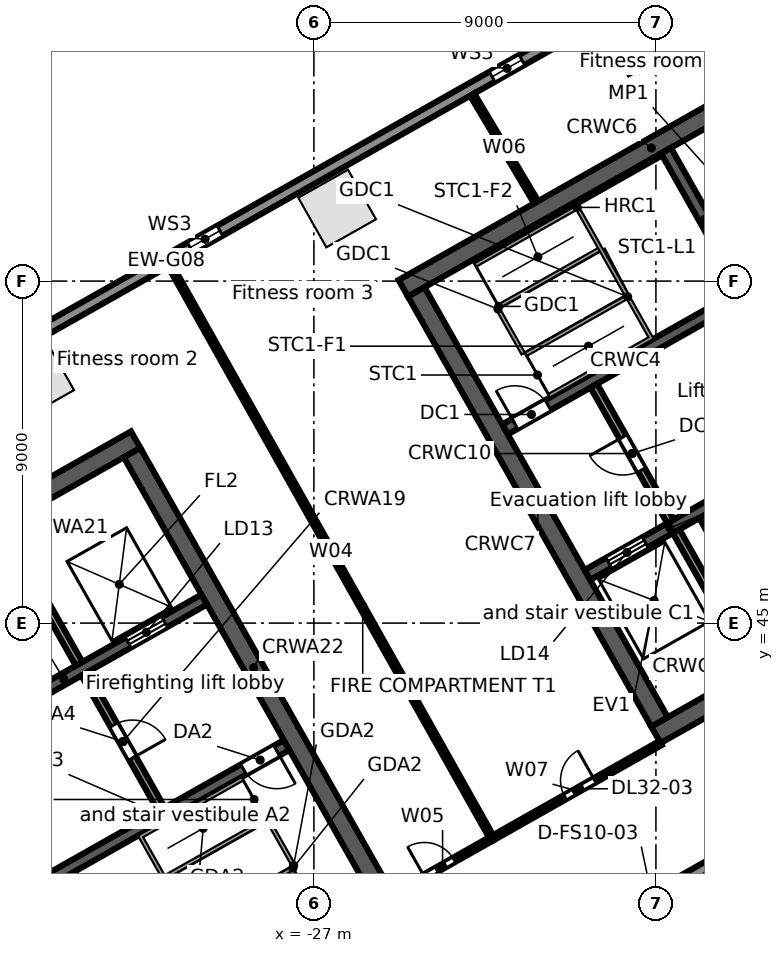
"""IFC4 building model, lengths in metres.
Left out: names, types, materials, properties, quantities, classifications, styles, units other than length and angle.
Written with IfcOpenShell. Run it as: python <this file> out.ifc"""

import sys

from ifc_helpers import new_model, si_unit, direction, frame, frame_2d, origin, origin_2d, place, context, subcontext, project, spatial, rectangle, extrude, element, fill, save


model = new_model("IFC4")
c1 = context("Model", 3, precision=1e-05, world=origin(), true_north=direction((0.0, 1.0)))
c2 = subcontext(c1, "Body", "Model", "MODEL_VIEW")
j1 = project(units=[si_unit("LENGTHUNIT", "METRE"), si_unit("PLANEANGLEUNIT", "RADIAN")], contexts=[c1])
p1 = place(None, origin())
s1 = spatial("IfcSite", under=j1, at=p1, CompositionType="ELEMENT")
p2 = place(p1, origin())
s2 = spatial("IfcBuilding", under=s1, at=p2, CompositionType="ELEMENT")
p3 = place(p2, frame((0.0, 0.0, 154.9)))
s3 = spatial("IfcBuildingStorey", under=s2, at=p3, CompositionType="ELEMENT", Elevation=154.9)
for number, where, z_axis, x_axis in (
    (1, (-18.441, 60.406, 0.0), (0.0, 0.0, 1.0), (-0.87, -0.492, 0.0)),
    (2, (-26.388, 55.91, 0.0), (0.0, 0.0, 1.0), (-0.87, -0.492, 0.0)),
    (3, (-34.334, 51.414, 0.0), (0.0, 0.0, 1.0), (-0.87, -0.492, 0.0)),
):
    element("IfcColumn", number, at=place(p3, frame(where, z_axis=z_axis, x_axis=x_axis)), inside=s3, PredefinedType="COLUMN", context=c2, shape_type="SweptSolid", body=[
        extrude(rectangle(XDim=1.5, YDim=1.5, at=origin_2d()), origin(), (0.0, 0.0, 1.0), 4.0),
    ])
p4 = place(p3, frame((-0.055, 47.969, 0.0), z_axis=(0.0, 0.0, 1.0), x_axis=(-0.870355730478, -0.492423499058, 0.0)))
e4 = element("IfcWall", 4, at=p4, inside=s3, PredefinedType="STANDARD", context=c2, shape_type="SweptSolid", body=[
    extrude(rectangle(XDim=43.75, YDim=0.3, at=frame_2d((21.875, 0.0))), origin(), (0.0, 0.0, 1.0), 3.68),
])
p5 = place(p4, frame((39.977, 0.0, 0.6)))
e5 = element("IfcOpeningElement", 5, at=p5, cuts=e4, PredefinedType="OPENING", context=c2, shape_type="SweptSolid", body=[
    extrude(rectangle(XDim=0.9, YDim=2.4, at=frame_2d((0.45, 1.2))), frame((0.0, 0.16, 0.0), z_axis=(0.0, -1.0, 0.0), x_axis=(1.0, 0.0, 0.0)), (0.0, 0.0, 1.0), 0.32),
])
p6 = place(p4, frame((37.338, 0.0, 0.0)))
e6 = element("IfcOpeningElement", 6, at=p6, cuts=e4, PredefinedType="OPENING", context=c2, shape_type="SweptSolid", body=[
    extrude(rectangle(XDim=1.8, YDim=2.4, at=frame_2d((0.9, 1.2))), frame((0.0, 0.16, 0.0), z_axis=(0.0, -1.0, 0.0), x_axis=(1.0, 0.0, 0.0)), (0.0, 0.0, 1.0), 0.32),
])
p7 = place(p4, frame((31.222, 0.0, 0.6)))
e7 = element("IfcOpeningElement", 7, at=p7, cuts=e4, PredefinedType="OPENING", context=c2, shape_type="SweptSolid", body=[
    extrude(rectangle(XDim=0.9, YDim=2.4, at=frame_2d((0.45, 1.2))), frame((0.0, 0.16, 0.0), z_axis=(0.0, -1.0, 0.0), x_axis=(1.0, 0.0, 0.0)), (0.0, 0.0, 1.0), 0.32),
])
p8 = place(p4, frame((28.584, 0.0, 0.0)))
e8 = element("IfcOpeningElement", 8, at=p8, cuts=e4, PredefinedType="OPENING", context=c2, shape_type="SweptSolid", body=[
    extrude(rectangle(XDim=1.8, YDim=2.4, at=frame_2d((0.9, 1.2))), frame((0.0, 0.16, 0.0), z_axis=(0.0, -1.0, 0.0), x_axis=(1.0, 0.0, 0.0)), (0.0, 0.0, 1.0), 0.32),
])
p9 = place(p4, frame((22.468, 0.0, 0.6)))
e9 = element("IfcOpeningElement", 9, at=p9, cuts=e4, PredefinedType="OPENING", context=c2, shape_type="SweptSolid", body=[
    extrude(rectangle(XDim=0.9, YDim=2.4, at=frame_2d((0.45, 1.2))), frame((0.0, 0.16, 0.0), z_axis=(0.0, -1.0, 0.0), x_axis=(1.0, 0.0, 0.0)), (0.0, 0.0, 1.0), 0.32),
])
p10 = place(p4, frame((19.829, 0.0, 0.0)))
e10 = element("IfcOpeningElement", 10, at=p10, cuts=e4, PredefinedType="OPENING", context=c2, shape_type="SweptSolid", body=[
    extrude(rectangle(XDim=1.8, YDim=2.4, at=frame_2d((0.9, 1.2))), frame((0.0, 0.16, 0.0), z_axis=(0.0, -1.0, 0.0), x_axis=(1.0, 0.0, 0.0)), (0.0, 0.0, 1.0), 0.32),
])
p11 = place(p4, frame((13.713, 0.0, 0.6)))
e11 = element("IfcOpeningElement", 11, at=p11, cuts=e4, PredefinedType="OPENING", context=c2, shape_type="SweptSolid", body=[
    extrude(rectangle(XDim=0.9, YDim=2.4, at=frame_2d((0.45, 1.2))), frame((0.0, 0.16, 0.0), z_axis=(0.0, -1.0, 0.0), x_axis=(1.0, 0.0, 0.0)), (0.0, 0.0, 1.0), 0.32),
])
p12 = place(p4, frame((11.075, 0.0, 0.0)))
e12 = element("IfcOpeningElement", 12, at=p12, cuts=e4, PredefinedType="OPENING", context=c2, shape_type="SweptSolid", body=[
    extrude(rectangle(XDim=1.8, YDim=2.4, at=frame_2d((0.9, 1.2))), frame((0.0, 0.16, 0.0), z_axis=(0.0, -1.0, 0.0), x_axis=(1.0, 0.0, 0.0)), (0.0, 0.0, 1.0), 0.32),
])
p13 = place(p4, frame((4.959, 0.0, 0.6)))
e13 = element("IfcOpeningElement", 13, at=p13, cuts=e4, PredefinedType="OPENING", context=c2, shape_type="SweptSolid", body=[
    extrude(rectangle(XDim=0.9, YDim=2.4, at=frame_2d((0.45, 1.2))), frame((0.0, 0.16, 0.0), z_axis=(0.0, -1.0, 0.0), x_axis=(1.0, 0.0, 0.0)), (0.0, 0.0, 1.0), 0.32),
])
p14 = place(p4, frame((2.32, 0.0, 0.0)))
e14 = element("IfcOpeningElement", 14, at=p14, cuts=e4, PredefinedType="OPENING", context=c2, shape_type="SweptSolid", body=[
    extrude(rectangle(XDim=1.8, YDim=2.4, at=frame_2d((0.9, 1.2))), frame((0.0, 0.16, 0.0), z_axis=(0.0, -1.0, 0.0), x_axis=(1.0, 0.0, 0.0)), (0.0, 0.0, 1.0), 0.32),
])
p15 = place(p3, frame((-58.745, 38.764, 0.0), z_axis=(0.0, 0.0, 1.0), x_axis=(0.870355811726, 0.492423355453, 0.0)))
e15 = element("IfcWall", 15, at=p15, inside=s3, PredefinedType="STANDARD", context=c2, shape_type="SweptSolid", body=[
    extrude(rectangle(XDim=64.025, YDim=0.3, at=frame_2d((32.013, 0.0))), origin(), (0.0, 0.0, 1.0), 3.68),
])
p16 = place(p15, frame((60.122, 0.0, 0.6)))
e16 = element("IfcOpeningElement", 16, at=p16, cuts=e15, PredefinedType="OPENING", context=c2, shape_type="SweptSolid", body=[
    extrude(rectangle(XDim=0.9, YDim=2.4, at=frame_2d((0.45, 1.2))), frame((0.0, 0.16, 0.0), z_axis=(0.0, -1.0, 0.0), x_axis=(1.0, 0.0, 0.0)), (0.0, 0.0, 1.0), 0.32),
])
p17 = place(p15, frame((50.992, 0.0, 0.6)))
e17 = element("IfcOpeningElement", 17, at=p17, cuts=e15, PredefinedType="OPENING", context=c2, shape_type="SweptSolid", body=[
    extrude(rectangle(XDim=0.9, YDim=2.4, at=frame_2d((0.45, 1.2))), frame((0.0, 0.16, 0.0), z_axis=(0.0, -1.0, 0.0), x_axis=(1.0, 0.0, 0.0)), (0.0, 0.0, 1.0), 0.32),
])
p18 = place(p15, frame((41.862, 0.0, 0.6)))
e18 = element("IfcOpeningElement", 18, at=p18, cuts=e15, PredefinedType="OPENING", context=c2, shape_type="SweptSolid", body=[
    extrude(rectangle(XDim=0.9, YDim=2.4, at=frame_2d((0.45, 1.2))), frame((0.0, 0.16, 0.0), z_axis=(0.0, -1.0, 0.0), x_axis=(1.0, 0.0, 0.0)), (0.0, 0.0, 1.0), 0.32),
])
p19 = place(p15, frame((32.732, 0.0, 0.6)))
e19 = element("IfcOpeningElement", 19, at=p19, cuts=e15, PredefinedType="OPENING", context=c2, shape_type="SweptSolid", body=[
    extrude(rectangle(XDim=0.9, YDim=2.4, at=frame_2d((0.45, 1.2))), frame((0.0, 0.16, 0.0), z_axis=(0.0, -1.0, 0.0), x_axis=(1.0, 0.0, 0.0)), (0.0, 0.0, 1.0), 0.32),
])
p20 = place(p15, frame((23.602, 0.0, 0.6)))
e20 = element("IfcOpeningElement", 20, at=p20, cuts=e15, PredefinedType="OPENING", context=c2, shape_type="SweptSolid", body=[
    extrude(rectangle(XDim=0.9, YDim=2.4, at=frame_2d((0.45, 1.2))), frame((0.0, 0.16, 0.0), z_axis=(0.0, -1.0, 0.0), x_axis=(1.0, 0.0, 0.0)), (0.0, 0.0, 1.0), 0.32),
])
p21 = place(p15, frame((14.472, 0.0, 0.6)))
e21 = element("IfcOpeningElement", 21, at=p21, cuts=e15, PredefinedType="OPENING", context=c2, shape_type="SweptSolid", body=[
    extrude(rectangle(XDim=0.9, YDim=2.4, at=frame_2d((0.45, 1.2))), frame((0.0, 0.16, 0.0), z_axis=(0.0, -1.0, 0.0), x_axis=(1.0, 0.0, 0.0)), (0.0, 0.0, 1.0), 0.32),
])
p22 = place(p15, frame((5.342, 0.0, 0.6)))
e22 = element("IfcOpeningElement", 22, at=p22, cuts=e15, PredefinedType="OPENING", context=c2, shape_type="SweptSolid", body=[
    extrude(rectangle(XDim=0.9, YDim=2.4, at=frame_2d((0.45, 1.2))), frame((0.0, 0.16, 0.0), z_axis=(0.0, -1.0, 0.0), x_axis=(1.0, 0.0, 0.0)), (0.0, 0.0, 1.0), 0.32),
])
p23 = place(p3, frame((-34.245, 38.097, 0.0), z_axis=(0.0, 0.0, 1.0), x_axis=(0.870364520461, 0.492407962489, 0.0)))
e23 = element("IfcWall", 23, at=p23, inside=s3, PredefinedType="SOLIDWALL", context=c2, shape_type="SweptSolid", body=[
    extrude(rectangle(XDim=7.5, YDim=0.3, at=frame_2d((3.75, 0.0))), origin(), (0.0, 0.0, 1.0), 3.68),
])
p24 = place(p23, frame((6.2, 0.0, 0.0)))
e24 = element("IfcOpeningElement", 24, at=p24, cuts=e23, PredefinedType="OPENING", context=c2, shape_type="SweptSolid", body=[
    extrude(rectangle(XDim=1.0, YDim=2.1, at=frame_2d((0.5, 1.05))), frame((0.0, 0.16, 0.0), z_axis=(0.0, -1.0, 0.0), x_axis=(1.0, 0.0, 0.0)), (0.0, 0.0, 1.0), 0.32),
])
p25 = place(p3, frame((-37.282, 41.435, 0.0), z_axis=(0.0, 0.0, 1.0), x_axis=(0.870356271124, 0.492422543467, 0.0)))
e25 = element("IfcWall", 25, at=p25, inside=s3, PredefinedType="SOLIDWALL", context=c2, shape_type="SweptSolid", body=[
    extrude(rectangle(XDim=8.5, YDim=0.3, at=frame_2d((4.25, 0.0))), origin(), (0.0, 0.0, 1.0), 3.68),
])
p26 = place(p25, frame((6.2, 0.0, 0.0)))
e26 = element("IfcOpeningElement", 26, at=p26, cuts=e25, PredefinedType="OPENING", context=c2, shape_type="SweptSolid", body=[
    extrude(rectangle(XDim=1.1, YDim=2.1, at=frame_2d((0.55, 1.05))), frame((0.0, 0.16, 0.0), z_axis=(0.0, -1.0, 0.0), x_axis=(1.0, 0.0, 0.0)), (0.0, 0.0, 1.0), 0.32),
])
p27 = place(p25, frame((1.95, 0.0, 0.0)))
e27 = element("IfcOpeningElement", 27, at=p27, cuts=e25, PredefinedType="OPENING", context=c2, shape_type="SweptSolid", body=[
    extrude(rectangle(XDim=0.9, YDim=2.1, at=frame_2d((0.45, 1.05))), frame((0.0, 0.16, 0.0), z_axis=(0.0, -1.0, 0.0), x_axis=(1.0, 0.0, 0.0)), (0.0, 0.0, 1.0), 0.32),
])
p28 = place(p3, frame((-46.486, 41.455, 0.0), z_axis=(0.0, 0.0, 1.0), x_axis=(0.870353598469, 0.492427267353, 0.0)))
e28 = element("IfcWall", 28, at=p28, inside=s3, PredefinedType="SOLIDWALL", context=c2, shape_type="SweptSolid", body=[
    extrude(rectangle(XDim=17.0, YDim=0.5, at=frame_2d((8.5, 0.0))), origin(), (0.0, 0.0, 1.0), 3.68),
])
p29 = place(p3, frame((-33.031, 43.667, 0.0), z_axis=(0.0, 0.0, 1.0), x_axis=(0.492408451753, -0.87036424366, 0.0)))
e29 = element("IfcWall", 29, at=p29, inside=s3, PredefinedType="PARTITIONING", context=c2, shape_type="SweptSolid", body=[
    extrude(rectangle(XDim=4.1, YDim=0.2, at=frame_2d((2.05, 0.0))), origin(), (0.0, 0.0, 1.0), 3.68),
])
p30 = place(p29, frame((1.55, 0.0, 0.0)))
e30 = element("IfcOpeningElement", 30, at=p30, cuts=e29, PredefinedType="OPENING", context=c2, shape_type="SweptSolid", body=[
    extrude(rectangle(XDim=1.0, YDim=2.1, at=frame_2d((0.5, 1.05))), frame((0.0, 0.11, 0.0), z_axis=(0.0, -1.0, 0.0), x_axis=(1.0, 0.0, 0.0)), (0.0, 0.0, 1.0), 0.22),
])
p31 = place(p3, frame((-35.222, 47.541, 0.0), z_axis=(0.0, 0.0, 1.0), x_axis=(0.492421666909, -0.870356767055, 0.0)))
e31 = element("IfcWall", 31, at=p31, inside=s3, PredefinedType="SOLIDWALL", context=c2, shape_type="SweptSolid", body=[
    extrude(rectangle(XDim=4.15, YDim=0.2, at=frame_2d((2.075, 0.0))), origin(), (0.0, 0.0, 1.0), 3.68),
])
p32 = place(p3, frame((-31.784, 49.486, 0.0), z_axis=(0.0, 0.0, 1.0), x_axis=(0.492435316254, -0.870349044525, 0.0)))
e32 = element("IfcWall", 32, at=p32, inside=s3, PredefinedType="SOLIDWALL", context=c2, shape_type="SweptSolid", body=[
    extrude(rectangle(XDim=13.0, YDim=0.5, at=frame_2d((6.5, 0.0))), origin(), (0.0, 0.0, 1.0), 3.68),
])
p33 = place(p3, frame((-18.0, 42.061, 0.0), z_axis=(0.0, 0.0, 1.0), x_axis=(0.870356627484, 0.492421913601, 0.0)))
e33 = element("IfcWall", 33, at=p33, inside=s3, PredefinedType="SOLIDWALL", context=c2, shape_type="SweptSolid", body=[
    extrude(rectangle(XDim=15.0, YDim=0.5, at=frame_2d((7.5, 0.0))), origin(), (0.0, 0.0, 1.0), 3.68),
])
p34 = place(p33, frame((6.1, 0.0, 0.0)))
e34 = element("IfcOpeningElement", 34, at=p34, cuts=e33, PredefinedType="OPENING", context=c2, shape_type="SweptSolid", body=[
    extrude(rectangle(XDim=1.2, YDim=2.1, at=frame_2d((0.6, 1.05))), frame((0.0, 0.26, 0.0), z_axis=(0.0, -1.0, 0.0), x_axis=(1.0, 0.0, 0.0)), (0.0, 0.0, 1.0), 0.52),
])
p35 = place(p3, frame((-19.805, 46.267, 0.0), z_axis=(0.0, 0.0, 1.0), x_axis=(0.870353598469, 0.492427267353, 0.0)))
e35 = element("IfcWall", 35, at=p35, inside=s3, PredefinedType="SOLIDWALL", context=c2, shape_type="SweptSolid", body=[
    extrude(rectangle(XDim=5.0, YDim=0.3, at=frame_2d((2.5, 0.0))), origin(), (0.0, 0.0, 1.0), 3.68),
])
p36 = place(p35, frame((0.65, 0.0, 0.0)))
e36 = element("IfcOpeningElement", 36, at=p36, cuts=e35, PredefinedType="OPENING", context=c2, shape_type="SweptSolid", body=[
    extrude(rectangle(XDim=1.1, YDim=2.1, at=frame_2d((0.55, 1.05))), frame((0.0, 0.16, 0.0), z_axis=(0.0, -1.0, 0.0), x_axis=(1.0, 0.0, 0.0)), (0.0, 0.0, 1.0), 0.32),
])
p37 = place(p35, frame((3.75, 0.0, 0.0)))
e37 = element("IfcOpeningElement", 37, at=p37, cuts=e35, PredefinedType="OPENING", context=c2, shape_type="SweptSolid", body=[
    extrude(rectangle(XDim=0.9, YDim=2.1, at=frame_2d((0.45, 1.05))), frame((0.0, 0.16, 0.0), z_axis=(0.0, -1.0, 0.0), x_axis=(1.0, 0.0, 0.0)), (0.0, 0.0, 1.0), 0.32),
])
p38 = place(p3, frame((-21.972, 50.097, 0.0), z_axis=(0.0, 0.0, 1.0), x_axis=(0.870350976978, 0.492431900747, 0.0)))
e38 = element("IfcWall", 38, at=p38, inside=s3, PredefinedType="SOLIDWALL", context=c2, shape_type="SweptSolid", body=[
    extrude(rectangle(XDim=7.3, YDim=0.3, at=frame_2d((3.65, 0.0))), origin(), (0.0, 0.0, 1.0), 3.68),
])
p39 = place(p38, frame((0.3, 0.0, 0.0)))
e39 = element("IfcOpeningElement", 39, at=p39, cuts=e38, PredefinedType="OPENING", context=c2, shape_type="SweptSolid", body=[
    extrude(rectangle(XDim=1.0, YDim=2.1, at=frame_2d((0.5, 1.05))), frame((0.0, 0.16, 0.0), z_axis=(0.0, -1.0, 0.0), x_axis=(1.0, 0.0, 0.0)), (0.0, 0.0, 1.0), 0.32),
])
p40 = place(p3, frame((-24.647, 53.811, 0.0), z_axis=(0.0, 0.0, 1.0), x_axis=(0.87034965173, 0.492434243055, 0.0)))
e40 = element("IfcWall", 40, at=p40, inside=s3, PredefinedType="SOLIDWALL", context=c2, shape_type="SweptSolid", body=[
    extrude(rectangle(XDim=15.0, YDim=0.5, at=frame_2d((7.5, 0.0))), origin(), (0.0, 0.0, 1.0), 3.68),
])
p41 = place(p3, frame((-24.307, 53.716, 0.0), z_axis=(0.0, 0.0, 1.0), x_axis=(0.492427267353, -0.870353598469, 0.0)))
e41 = element("IfcWall", 41, at=p41, inside=s3, PredefinedType="SOLIDWALL", context=c2, shape_type="SweptSolid", body=[
    extrude(rectangle(XDim=13.0, YDim=0.5, at=frame_2d((6.5, 0.0))), origin(), (0.0, 0.0, 1.0), 3.68),
])
p42 = place(p3, frame((-17.469, 47.417, 0.0), z_axis=(0.0, 0.0, 1.0), x_axis=(0.492441017253, -0.870345818929, 0.0)))
e42 = element("IfcWall", 42, at=p42, inside=s3, PredefinedType="SOLIDWALL", context=c2, shape_type="SweptSolid", body=[
    extrude(rectangle(XDim=4.15, YDim=0.2, at=frame_2d((2.075, 0.0))), origin(), (0.0, 0.0, 1.0), 3.68),
])
p43 = place(p3, frame((-19.635, 51.246, 0.0), z_axis=(0.0, 0.0, 1.0), x_axis=(0.492408451753, -0.87036424366, 0.0)))
e43 = element("IfcWall", 43, at=p43, inside=s3, PredefinedType="PARTITIONING", context=c2, shape_type="SweptSolid", body=[
    extrude(rectangle(XDim=4.1, YDim=0.2, at=frame_2d((2.05, 0.0))), origin(), (0.0, 0.0, 1.0), 3.68),
])
p44 = place(p43, frame((1.55, 0.0, 0.0)))
e44 = element("IfcOpeningElement", 44, at=p44, cuts=e43, PredefinedType="OPENING", context=c2, shape_type="SweptSolid", body=[
    extrude(rectangle(XDim=1.0, YDim=2.1, at=frame_2d((0.5, 1.05))), frame((0.0, 0.11, 0.0), z_axis=(0.0, -1.0, 0.0), x_axis=(1.0, 0.0, 0.0)), (0.0, 0.0, 1.0), 0.22),
])
p45 = place(p3, frame((-16.772, 47.811, 0.0), z_axis=(0.0, 0.0, 1.0), x_axis=(0.492441017253, -0.870345818929, 0.0)))
e45 = element("IfcWall", 45, at=p45, inside=s3, PredefinedType="SOLIDWALL", context=c2, shape_type="SweptSolid", body=[
    extrude(rectangle(XDim=4.15, YDim=0.2, at=frame_2d((2.075, 0.0))), origin(), (0.0, 0.0, 1.0), 3.68),
])
p46 = place(p3, frame((-17.736, 57.434, 0.0), z_axis=(0.0, 0.0, 1.0), x_axis=(0.492421666909, -0.870356767055, 0.0)))
e46 = element("IfcWall", 46, at=p46, inside=s3, PredefinedType="SOLIDWALL", context=c2, shape_type="SweptSolid", body=[
    extrude(rectangle(XDim=4.15, YDim=0.3, at=frame_2d((2.075, 0.0))), origin(), (0.0, 0.0, 1.0), 3.68),
])
p47 = place(p3, frame((-30.785, 54.411, 0.0), z_axis=(0.0, 0.0, 1.0), x_axis=(0.490135904292, -0.871646026391, 0.0)))
e47 = element("IfcWall", 47, at=p47, inside=s3, PredefinedType="PARTITIONING", context=c2, shape_type="SweptSolid", body=[
    extrude(rectangle(XDim=17.295, YDim=0.125, at=frame_2d((8.647, 0.0))), origin(), (0.0, 0.0, 1.0), 2.852),
])
p48 = place(p3, frame((-24.919, 37.859, 0.0), z_axis=(0.0, 0.0, 1.0), x_axis=(0.870368744559, 0.492400496034, 0.0)))
e48 = element("IfcWall", 48, at=p48, inside=s3, PredefinedType="PARTITIONING", context=c2, shape_type="SweptSolid", body=[
    extrude(rectangle(XDim=3.0, YDim=0.125, at=frame_2d((1.5, 0.0))), origin(), (0.0, 0.0, 1.0), 2.852),
])
p49 = place(p48, frame((0.95, 0.0, 0.0)))
e49 = element("IfcOpeningElement", 49, at=p49, cuts=e48, PredefinedType="OPENING", context=c2, shape_type="SweptSolid", body=[
    extrude(rectangle(XDim=0.9, YDim=2.1, at=frame_2d((0.45, 1.05))), frame((0.0, 0.073, 0.0), z_axis=(0.0, -1.0, 0.0), x_axis=(1.0, 0.0, 0.0)), (0.0, 0.0, 1.0), 0.145),
])
p50 = place(p3, frame((-22.835, 58.908, 0.0), z_axis=(0.0, 0.0, 1.0), x_axis=(0.511113859879, -0.859513014584, 0.0)))
e50 = element("IfcWall", 50, at=p50, inside=s3, PredefinedType="PARTITIONING", context=c2, shape_type="SweptSolid", body=[
    extrude(rectangle(XDim=3.295, YDim=0.125, at=frame_2d((1.647, 0.0))), origin(), (0.0, 0.0, 1.0), 2.96),
])
p51 = place(p3, frame((-22.308, 39.336, 0.0), z_axis=(0.0, 0.0, 1.0), x_axis=(0.870351090701, 0.492431699747, 0.0)))
e51 = element("IfcWall", 51, at=p51, inside=s3, PredefinedType="PARTITIONING", context=c2, shape_type="SweptSolid", body=[
    extrude(rectangle(XDim=5.091, YDim=0.125, at=frame_2d((2.546, 0.0))), origin(), (0.0, 0.0, 1.0), 3.68),
])
p52 = place(p51, frame((2.2, 0.0, 0.0)))
e52 = element("IfcOpeningElement", 52, at=p52, cuts=e51, PredefinedType="OPENING", context=c2, shape_type="SweptSolid", body=[
    extrude(rectangle(XDim=0.9, YDim=2.1, at=frame_2d((0.45, 1.05))), frame((0.0, 0.073, 0.0), z_axis=(0.0, -1.0, 0.0), x_axis=(1.0, 0.0, 0.0)), (0.0, 0.0, 1.0), 0.145),
])
p53 = place(p18, origin())
e53 = element("IfcWindow", 53, at=p53, inside=s3, PartitioningType="SINGLE_PANEL", PredefinedType="WINDOW", context=c2, shape_type="SweptSolid", body=[
    extrude(rectangle(XDim=0.9, YDim=2.4, at=frame_2d((0.45, 1.2))), frame((0.0, 0.03, 0.0), z_axis=(0.0, -1.0, 0.0), x_axis=(1.0, 0.0, 0.0)), (0.0, 0.0, 1.0), 0.06),
])
fill(e18, e53)
p54 = place(p19, origin())
e54 = element("IfcWindow", 54, at=p54, inside=s3, PartitioningType="SINGLE_PANEL", PredefinedType="WINDOW", context=c2, shape_type="SweptSolid", body=[
    extrude(rectangle(XDim=0.9, YDim=2.4, at=frame_2d((0.45, 1.2))), frame((0.0, 0.03, 0.0), z_axis=(0.0, -1.0, 0.0), x_axis=(1.0, 0.0, 0.0)), (0.0, 0.0, 1.0), 0.06),
])
fill(e19, e54)
p55 = place(p26, origin())
e55 = element("IfcDoor", 55, at=p55, inside=s3, OperationType="DOUBLE_DOOR_SLIDING", PredefinedType="DOOR", context=c2, shape_type="SweptSolid", body=[
    extrude(rectangle(XDim=1.1, YDim=2.1, at=frame_2d((0.55, 1.05))), frame((0.0, 0.025, 0.0), z_axis=(0.0, -1.0, 0.0), x_axis=(1.0, 0.0, 0.0)), (0.0, 0.0, 1.0), 0.05),
])
fill(e26, e55)
p56 = place(p24, frame((1.0, 0.0, 0.0), z_axis=(0.0, 0.0, 1.0), x_axis=(-1.0, 0.0, 0.0)))
e56 = element("IfcDoor", 56, at=p56, inside=s3, OperationType="SINGLE_SWING_LEFT", PredefinedType="DOOR", context=c2, shape_type="SweptSolid", body=[
    extrude(rectangle(XDim=1.0, YDim=2.1, at=frame_2d((0.5, 1.05))), frame((0.0, 0.025, 0.0), z_axis=(0.0, -1.0, 0.0), x_axis=(1.0, 0.0, 0.0)), (0.0, 0.0, 1.0), 0.05),
])
fill(e24, e56)
p57 = place(p30, origin())
e57 = element("IfcDoor", 57, at=p57, inside=s3, OperationType="SINGLE_SWING_RIGHT", PredefinedType="DOOR", context=c2, shape_type="SweptSolid", body=[
    extrude(rectangle(XDim=1.0, YDim=2.1, at=frame_2d((0.5, 1.05))), frame((0.0, 0.025, 0.0), z_axis=(0.0, -1.0, 0.0), x_axis=(1.0, 0.0, 0.0)), (0.0, 0.0, 1.0), 0.05),
])
fill(e30, e57)
p58 = place(p36, origin())
e58 = element("IfcDoor", 58, at=p58, inside=s3, OperationType="DOUBLE_DOOR_SLIDING", PredefinedType="DOOR", context=c2, shape_type="SweptSolid", body=[
    extrude(rectangle(XDim=1.1, YDim=2.1, at=frame_2d((0.55, 1.05))), frame((0.0, 0.025, 0.0), z_axis=(0.0, -1.0, 0.0), x_axis=(1.0, 0.0, 0.0)), (0.0, 0.0, 1.0), 0.05),
])
fill(e36, e58)
p59 = place(p39, origin())
e59 = element("IfcDoor", 59, at=p59, inside=s3, OperationType="SINGLE_SWING_LEFT", PredefinedType="DOOR", context=c2, shape_type="SweptSolid", body=[
    extrude(rectangle(XDim=1.0, YDim=2.1, at=frame_2d((0.5, 1.05))), frame((0.0, 0.025, 0.0), z_axis=(0.0, -1.0, 0.0), x_axis=(1.0, 0.0, 0.0)), (0.0, 0.0, 1.0), 0.05),
])
fill(e39, e59)
p60 = place(p44, frame((1.0, 0.0, 0.0), z_axis=(0.0, 0.0, 1.0), x_axis=(-1.0, 0.0, 0.0)))
e60 = element("IfcDoor", 60, at=p60, inside=s3, OperationType="SINGLE_SWING_RIGHT", PredefinedType="DOOR", context=c2, shape_type="SweptSolid", body=[
    extrude(rectangle(XDim=1.0, YDim=2.1, at=frame_2d((0.5, 1.05))), frame((0.0, 0.025, 0.0), z_axis=(0.0, -1.0, 0.0), x_axis=(1.0, 0.0, 0.0)), (0.0, 0.0, 1.0), 0.05),
])
fill(e44, e60)
p61 = place(p49, origin())
e61 = element("IfcDoor", 61, at=p61, inside=s3, OperationType="SINGLE_SWING_LEFT", PredefinedType="DOOR", context=c2, shape_type="SweptSolid", body=[
    extrude(rectangle(XDim=0.9, YDim=2.1, at=frame_2d((0.45, 1.05))), frame((0.0, 0.025, 0.0), z_axis=(0.0, -1.0, 0.0), x_axis=(1.0, 0.0, 0.0)), (0.0, 0.0, 1.0), 0.05),
])
fill(e49, e61)
p62 = place(p52, origin())
e62 = element("IfcDoor", 62, at=p62, inside=s3, OperationType="SINGLE_SWING_RIGHT", PredefinedType="DOOR", context=c2, shape_type="SweptSolid", body=[
    extrude(rectangle(XDim=0.9, YDim=2.1, at=frame_2d((0.45, 1.05))), frame((0.0, 0.025, 0.0), z_axis=(0.0, -1.0, 0.0), x_axis=(1.0, 0.0, 0.0)), (0.0, 0.0, 1.0), 0.05),
])
fill(e52, e62)
save(model, sys.argv[1])
